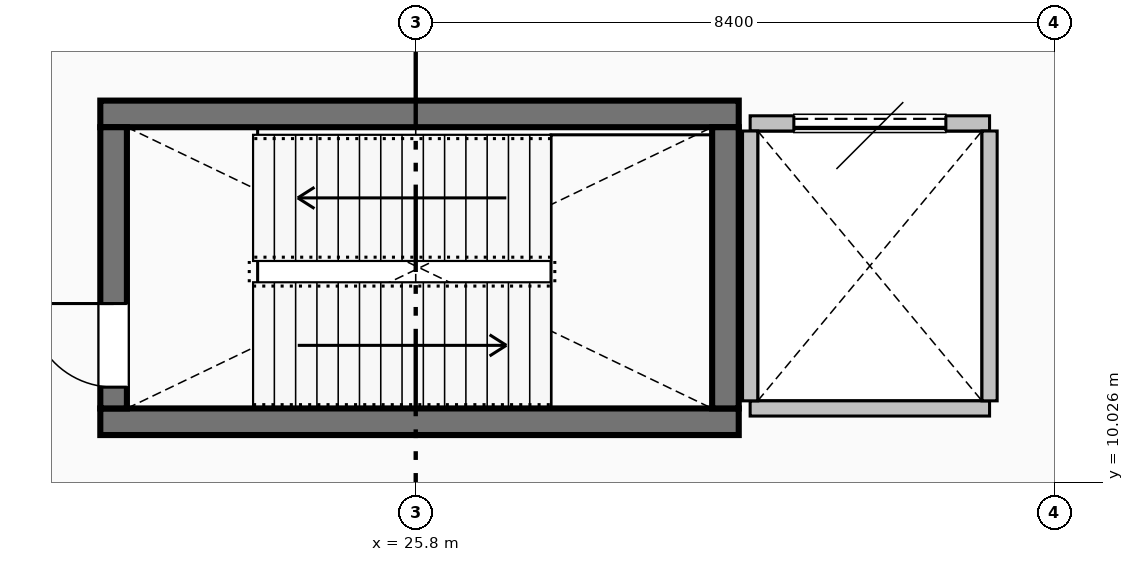
"""IFC4 building model, lengths in metres.
Left out: names, types, materials, properties, quantities, classifications, styles, units other than length and angle.
Written with IfcOpenShell. Run it as: python <this file> out.ifc"""

import sys

from ifc_helpers import new_model, si_unit, direction, frame, frame_2d, origin, place, context, subcontext, project, spatial, rectangle, extrude, element, fill, save


model = new_model("IFC4")
c1 = context("Model", 3, precision=1e-05, world=origin(), true_north=direction((0.0, 1.0)))
c2 = subcontext(c1, "Body", "Model", "MODEL_VIEW")
j1 = project(units=[si_unit("LENGTHUNIT", "METRE"), si_unit("PLANEANGLEUNIT", "RADIAN")], contexts=[c1])
p1 = place(None, origin())
s1 = spatial("IfcSite", under=j1, at=p1, CompositionType="ELEMENT")
p2 = place(p1, origin())
s2 = spatial("IfcBuilding", under=s1, at=p2, CompositionType="ELEMENT")
p3 = place(p2, origin())
s3 = spatial("IfcBuildingStorey", under=s2, at=p3, CompositionType="ELEMENT", Elevation=0.0)
for number, where, z_axis, x_axis in (
    (1, (21.65, 10.825, 0.0), (0.0, 0.0, 1.0), (1.0, 0.0, 0.0)),
    (2, (30.05, 14.875, 0.0), (0.0, 0.0, 1.0), (-1.0, 0.0, 0.0)),
):
    element("IfcWall", number, at=place(p3, frame(where, z_axis=z_axis, x_axis=x_axis)), inside=s3, PredefinedType="SHEAR", context=c2, shape_type="SweptSolid", body=[
        extrude(rectangle(XDim=8.4, YDim=0.35, at=frame_2d((4.2, 0.0))), origin(), (0.0, 0.0, 1.0), 5.1),
    ])
p4 = place(p3, frame((21.825, 11.0, 0.0), z_axis=(0.0, 0.0, 1.0), x_axis=(0.0, 1.0, 0.0)))
e3 = element("IfcWall", 3, at=p4, inside=s3, PredefinedType="SHEAR", context=c2, shape_type="SweptSolid", body=[
    extrude(rectangle(XDim=3.7, YDim=0.35, at=frame_2d((1.85, 0.0))), origin(), (0.0, 0.0, 1.0), 5.1),
])
p5 = place(p4, frame((0.28, 0.0, 0.0)))
e4 = element("IfcOpeningElement", 4, at=p5, cuts=e3, PredefinedType="OPENING", context=c2, shape_type="SweptSolid", body=[
    extrude(rectangle(XDim=1.1, YDim=2.08, at=frame_2d((0.55, 1.04))), frame((0.0, 0.185, 0.0), z_axis=(0.0, -1.0, 0.0), x_axis=(1.0, 0.0, 0.0)), (0.0, 0.0, 1.0), 0.37),
])
p6 = place(p3, frame((29.875, 14.7, 0.0), z_axis=(0.0, 0.0, 1.0), x_axis=(0.0, -1.0, 0.0)))
e5 = element("IfcWall", 5, at=p6, inside=s3, PredefinedType="SHEAR", context=c2, shape_type="SweptSolid", body=[
    extrude(rectangle(XDim=3.7, YDim=0.35, at=frame_2d((1.85, 0.0))), origin(), (0.0, 0.0, 1.0), 5.1),
])
p7 = place(p3, frame((30.2, 11.0, 0.0), z_axis=(0.0, 0.0, 1.0), x_axis=(1.0, 0.0, 0.0)))
e6 = element("IfcWall", 6, at=p7, inside=s3, PredefinedType="PARTITIONING", context=c2, shape_type="SweptSolid", body=[
    extrude(rectangle(XDim=3.15, YDim=0.2, at=frame_2d((1.575, 0.0))), origin(), (0.0, 0.0, 1.0), 5.092),
])
p8 = place(p3, frame((33.35, 14.75, 0.0), z_axis=(0.0, 0.0, 1.0), x_axis=(-1.0, 0.0, 0.0)))
e7 = element("IfcWall", 7, at=p8, inside=s3, PredefinedType="PARTITIONING", context=c2, shape_type="SweptSolid", body=[
    extrude(rectangle(XDim=3.15, YDim=0.2, at=frame_2d((1.575, 0.0))), origin(), (0.0, 0.0, 1.0), 5.092),
])
p9 = place(p8, frame((0.575, 0.0, 0.0)))
e8 = element("IfcOpeningElement", 8, at=p9, cuts=e7, PredefinedType="OPENING", context=c2, shape_type="SweptSolid", body=[
    extrude(rectangle(XDim=2.0, YDim=2.35, at=frame_2d((1.0, 1.175))), frame((0.0, 0.11, 0.0), z_axis=(0.0, -1.0, 0.0), x_axis=(1.0, 0.0, 0.0)), (0.0, 0.0, 1.0), 0.22),
])
for number, where, z_axis, x_axis in (
    (9, (30.2, 11.1, 0.0), (0.0, 0.0, 1.0), (0.0, 1.0, 0.0)),
    (10, (33.35, 14.65, 0.0), (0.0, 0.0, 1.0), (0.0, -1.0, 0.0)),
):
    element("IfcWall", number, at=place(p3, frame(where, z_axis=z_axis, x_axis=x_axis)), inside=s3, PredefinedType="PARTITIONING", context=c2, shape_type="SweptSolid", body=[
        extrude(rectangle(XDim=3.55, YDim=0.2, at=frame_2d((1.775, 0.0))), origin(), (0.0, 0.0, 1.0), 5.092),
    ])
p10 = place(p5, origin())
e11 = element("IfcDoor", 11, at=p10, inside=s3, OperationType="SINGLE_SWING_RIGHT", PredefinedType="DOOR", context=c2, shape_type="SweptSolid", body=[
    extrude(rectangle(XDim=1.1, YDim=2.08, at=frame_2d((0.55, 1.04))), frame((0.0, 0.025, 0.0), z_axis=(0.0, -1.0, 0.0), x_axis=(1.0, 0.0, 0.0)), (0.0, 0.0, 1.0), 0.05),
])
fill(e4, e11)
p11 = place(p9, origin())
e12 = element("IfcDoor", 12, at=p11, inside=s3, OperationType="SLIDING_TO_LEFT", PredefinedType="DOOR", context=c2, shape_type="SweptSolid", body=[
    extrude(rectangle(XDim=2.0, YDim=2.35, at=frame_2d((1.0, 1.175))), frame((0.0, 0.025, 0.0), z_axis=(0.0, -1.0, 0.0), x_axis=(1.0, 0.0, 0.0)), (0.0, 0.0, 1.0), 0.05),
])
fill(e8, e12)
save(model, sys.argv[1])
